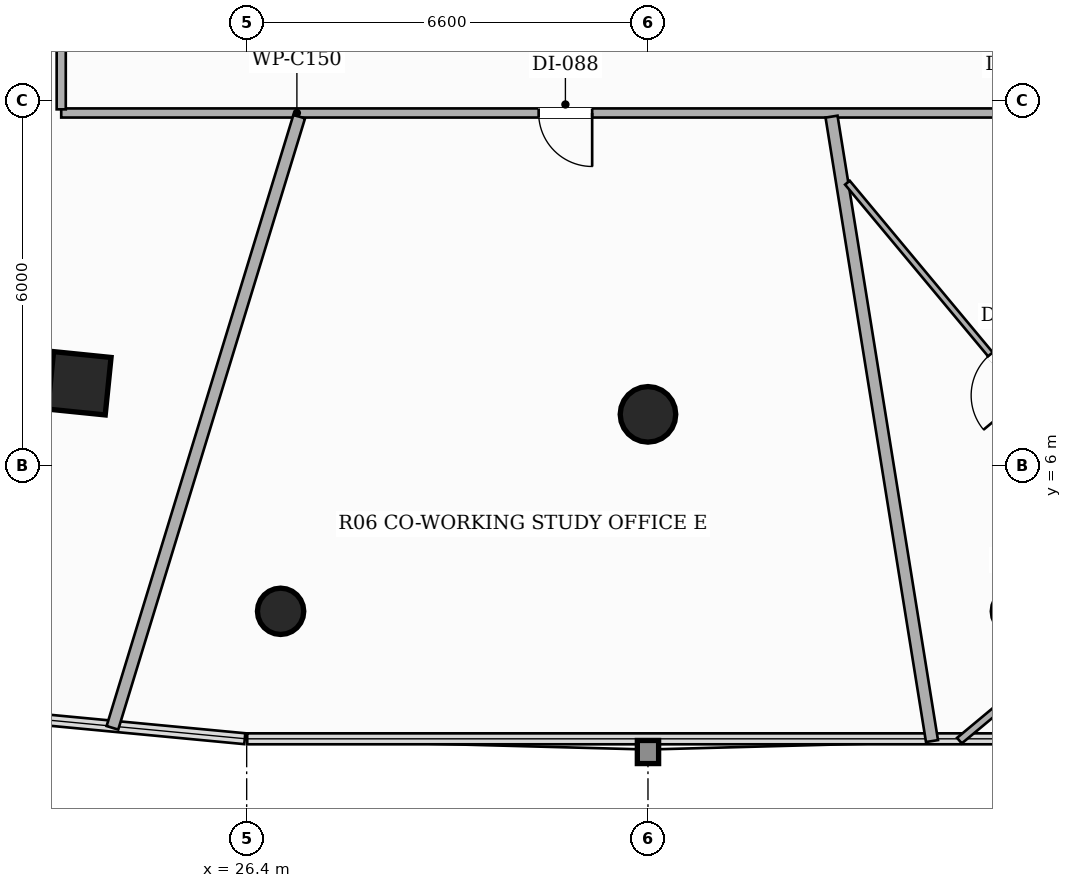
"""IFC4 building model, lengths in metres.
Left out: names, types, materials, properties, quantities, classifications, styles, units other than length and angle.
Written with IfcOpenShell. Run it as: python <this file> out.ifc"""

import sys

from ifc_helpers import new_model, si_unit, direction, frame, frame_2d, origin, origin_2d, place, context, subcontext, project, spatial, rectangle, hollow_rectangle, hollow_circle, extrude, element, fill, save


model = new_model("IFC4")
c1 = context("Model", 3, precision=1e-05, world=origin(), true_north=direction((0.0, 1.0)))
c2 = subcontext(c1, "Body", "Model", "MODEL_VIEW")
j1 = project(units=[si_unit("LENGTHUNIT", "METRE"), si_unit("PLANEANGLEUNIT", "RADIAN")], contexts=[c1])
p1 = place(None, origin())
s1 = spatial("IfcSite", under=j1, at=p1, CompositionType="ELEMENT")
p2 = place(p1, origin())
s2 = spatial("IfcBuilding", under=s1, at=p2, CompositionType="ELEMENT")
p3 = place(p2, frame((0.0, 0.0, 50.0)))
s3 = spatial("IfcBuildingStorey", under=s2, at=p3, CompositionType="ELEMENT", Elevation=50.0)
p4 = place(p3, frame((23.649, 7.355, 0.0), z_axis=(0.0, 0.0, 1.0), x_axis=(-0.994880708829, 0.101056297183, 0.0)))
e1 = element("IfcColumn", 1, at=p4, inside=s3, PredefinedType="COLUMN", context=c2, shape_type="SweptSolid", body=[
    extrude(hollow_rectangle(XDim=0.95, YDim=0.95, WallThickness=0.032, at=origin_2d()), origin(), (0.0, 0.0, 1.0), 3.3),
])
p5 = place(p3, frame((33.0, 6.844, 0.0), z_axis=(0.0, 0.0, 1.0), x_axis=(1.0, 0.0, 0.0)))
e2 = element("IfcColumn", 2, at=p5, inside=s3, PredefinedType="COLUMN", context=c2, shape_type="SweptSolid", body=[
    extrude(hollow_circle(Radius=0.457, WallThickness=0.025, at=origin_2d()), origin(), (0.0, 0.0, 1.0), 3.3),
])
for number, where, z_axis, x_axis in (
    (3, (26.958, 3.605, 0.0), (0.0, 0.0, 1.0), (1.0, 0.0, 0.0)),
    (4, (39.042, 3.605, 0.0), (0.0, 0.0, 1.0), (1.0, 0.0, 0.0)),
):
    element("IfcColumn", number, at=place(p3, frame(where, z_axis=z_axis, x_axis=x_axis)), inside=s3, PredefinedType="COLUMN", context=c2, shape_type="SweptSolid", body=[
        extrude(hollow_circle(Radius=0.381, WallThickness=0.022, at=origin_2d()), origin(), (0.0, 0.0, 1.0), 3.3),
    ])
p6 = place(p3, frame((42.59, 11.8, 0.0), z_axis=(0.0, 0.0, 1.0), x_axis=(-1.0, 0.0, 0.0)))
e5 = element("IfcWall", 5, at=p6, inside=s3, PredefinedType="PARTITIONING", context=c2, shape_type="SweptSolid", body=[
    extrude(rectangle(XDim=19.24, YDim=0.15, at=frame_2d((9.62, 0.0))), origin(), (0.0, 0.0, 1.0), 2.669),
])
p7 = place(p6, frame((10.508, 0.0, 0.0)))
e6 = element("IfcOpeningElement", 6, at=p7, cuts=e5, PredefinedType="OPENING", context=c2, shape_type="SweptSolid", body=[
    extrude(rectangle(XDim=0.88, YDim=2.1, at=frame_2d((0.44, 1.05))), frame((0.0, 0.085, 0.0), z_axis=(0.0, -1.0, 0.0), x_axis=(1.0, 0.0, 0.0)), (0.0, 0.0, 1.0), 0.17),
])
p8 = place(p6, frame((2.98, 0.0, 0.0)))
e7 = element("IfcOpeningElement", 7, at=p8, cuts=e5, PredefinedType="OPENING", context=c2, shape_type="SweptSolid", body=[
    extrude(rectangle(XDim=0.92, YDim=2.15, at=frame_2d((0.46, 1.075))), frame((0.0, 0.085, 0.0), z_axis=(0.0, -1.0, 0.0), x_axis=(1.0, 0.0, 0.0)), (0.0, 0.0, 1.0), 0.17),
])
p9 = place(p3, frame((23.35, 11.86, 0.0), z_axis=(0.0, 0.0, 1.0), x_axis=(0.0, 1.0, 0.0)))
e8 = element("IfcWall", 8, at=p9, inside=s3, PredefinedType="PARTITIONING", context=c2, shape_type="SweptSolid", body=[
    extrude(rectangle(XDim=25.04, YDim=0.15, at=frame_2d((12.52, 0.0))), origin(), (0.0, 0.0, 1.0), 2.413),
])
p10 = place(p9, frame((18.67, 0.0, 0.0)))
e9 = element("IfcOpeningElement", 9, at=p10, cuts=e8, PredefinedType="OPENING", context=c2, shape_type="SweptSolid", body=[
    extrude(rectangle(XDim=0.88, YDim=2.1, at=frame_2d((0.44, 1.05))), frame((0.0, 0.085, 0.0), z_axis=(0.0, -1.0, 0.0), x_axis=(1.0, 0.0, 0.0)), (0.0, 0.0, 1.0), 0.17),
])
p11 = place(p9, frame((3.543, 0.0, 0.0)))
e10 = element("IfcOpeningElement", 10, at=p11, cuts=e8, PredefinedType="OPENING", context=c2, shape_type="SweptSolid", body=[
    extrude(rectangle(XDim=0.88, YDim=2.1, at=frame_2d((0.44, 1.05))), frame((0.0, 0.085, 0.0), z_axis=(0.0, -1.0, 0.0), x_axis=(1.0, 0.0, 0.0)), (0.0, 0.0, 1.0), 0.17),
])
p12 = place(p9, frame((8.445, 0.0, 0.0)))
e11 = element("IfcOpeningElement", 11, at=p12, cuts=e8, PredefinedType="OPENING", context=c2, shape_type="SweptSolid", body=[
    extrude(rectangle(XDim=0.92, YDim=2.15, at=frame_2d((0.46, 1.075))), frame((0.0, 0.085, 0.0), z_axis=(0.0, -1.0, 0.0), x_axis=(1.0, 0.0, 0.0)), (0.0, 0.0, 1.0), 0.17),
])
p13 = place(p9, frame((11.535, 0.0, 0.0)))
e12 = element("IfcOpeningElement", 12, at=p13, cuts=e8, PredefinedType="OPENING", context=c2, shape_type="SweptSolid", body=[
    extrude(rectangle(XDim=0.92, YDim=2.15, at=frame_2d((0.46, 1.075))), frame((0.0, 0.085, 0.0), z_axis=(0.0, -1.0, 0.0), x_axis=(1.0, 0.0, 0.0)), (0.0, 0.0, 1.0), 0.17),
])
p14 = place(p3, frame((27.264, 11.74, 0.0), z_axis=(0.0, 0.0, 1.0), x_axis=(-0.292294665238, -0.956328305904, 0.0)))
e13 = element("IfcWall", 13, at=p14, inside=s3, PredefinedType="PARTITIONING", context=c2, shape_type="SweptSolid", body=[
    extrude(rectangle(XDim=10.51, YDim=0.2, at=frame_2d((5.255, 0.0))), origin(), (0.0, 0.0, 1.0), 2.413),
])
p15 = place(p3, frame((9.097, 3.318, 0.0), z_axis=(0.0, 0.0, 1.0), x_axis=(0.66036589704, 0.750943993935, 0.0)))
e14 = element("IfcWall", 14, at=p15, inside=s3, PredefinedType="PARTITIONING", context=c2, shape_type="SweptSolid", body=[
    extrude(rectangle(XDim=21.493, YDim=0.2, at=frame_2d((10.747, 0.0))), origin(), (0.0, 0.0, 1.0), 2.413),
])
p16 = place(p3, frame((36.019, 11.74, 0.0), z_axis=(0.0, 0.0, 1.0), x_axis=(0.158816201081, -0.98730816581, 0.0)))
e15 = element("IfcWall", 15, at=p16, inside=s3, PredefinedType="PARTITIONING", context=c2, shape_type="SweptSolid", body=[
    extrude(rectangle(XDim=10.401, YDim=0.2, at=frame_2d((5.201, 0.0))), origin(), (0.0, 0.0, 1.0), 2.413),
])
p17 = place(p3, frame((4.362, 6.486, 0.0), z_axis=(0.0, 0.0, 1.0), x_axis=(0.766256370513, 0.642534959865, 0.0)))
e16 = element("IfcWall", 16, at=p17, inside=s3, PredefinedType="PARTITIONING", context=c2, shape_type="SweptSolid", body=[
    extrude(rectangle(XDim=24.702, YDim=0.2, at=frame_2d((12.351, 0.0))), origin(), (0.0, 0.0, 1.0), 2.413),
])
p18 = place(p3, frame((41.547, 4.331, 0.0), z_axis=(0.0, 0.0, 1.0), x_axis=(-0.640035566376, 0.768345282913, 0.0)))
e17 = element("IfcWall", 17, at=p18, inside=s3, PredefinedType="PARTITIONING", context=c2, shape_type="SweptSolid", body=[
    extrude(rectangle(XDim=8.229, YDim=0.1, at=frame_2d((4.115, 0.0))), origin(), (0.0, 0.0, 1.0), 2.413),
])
p19 = place(p18, frame((3.675, 0.0, 0.0)))
e18 = element("IfcOpeningElement", 18, at=p19, cuts=e17, PredefinedType="OPENING", context=c2, shape_type="SweptSolid", body=[
    extrude(rectangle(XDim=0.88, YDim=2.1, at=frame_2d((0.44, 1.05))), frame((0.0, 0.06, 0.0), z_axis=(0.0, -1.0, 0.0), x_axis=(1.0, 0.0, 0.0)), (0.0, 0.0, 1.0), 0.12),
])
p20 = place(p3, frame((38.122, 1.478, 0.0), z_axis=(0.0, 0.0, 1.0), x_axis=(0.768351451836, 0.640028160678, 0.0)))
e19 = element("IfcWall", 19, at=p20, inside=s3, PredefinedType="PARTITIONING", context=c2, shape_type="SweptSolid", body=[
    extrude(rectangle(XDim=4.458, YDim=0.12, at=frame_2d((2.229, 0.0))), origin(), (0.0, 0.0, 1.0), 3.06),
])
p21 = place(p7, origin())
e20 = element("IfcDoor", 20, at=p21, inside=s3, OperationType="SINGLE_SWING_LEFT", PredefinedType="DOOR", context=c2, shape_type="SweptSolid", body=[
    extrude(rectangle(XDim=0.88, YDim=2.1, at=frame_2d((0.44, 1.05))), frame((0.0, 0.025, 0.0), z_axis=(0.0, -1.0, 0.0), x_axis=(1.0, 0.0, 0.0)), (0.0, 0.0, 1.0), 0.05),
])
fill(e6, e20)
p22 = place(p19, origin())
e21 = element("IfcDoor", 21, at=p22, inside=s3, OperationType="SINGLE_SWING_LEFT", PredefinedType="DOOR", context=c2, shape_type="SweptSolid", body=[
    extrude(rectangle(XDim=0.88, YDim=2.1, at=frame_2d((0.44, 1.05))), frame((0.0, 0.025, 0.0), z_axis=(0.0, -1.0, 0.0), x_axis=(1.0, 0.0, 0.0)), (0.0, 0.0, 1.0), 0.05),
])
fill(e18, e21)
save(model, sys.argv[1])
